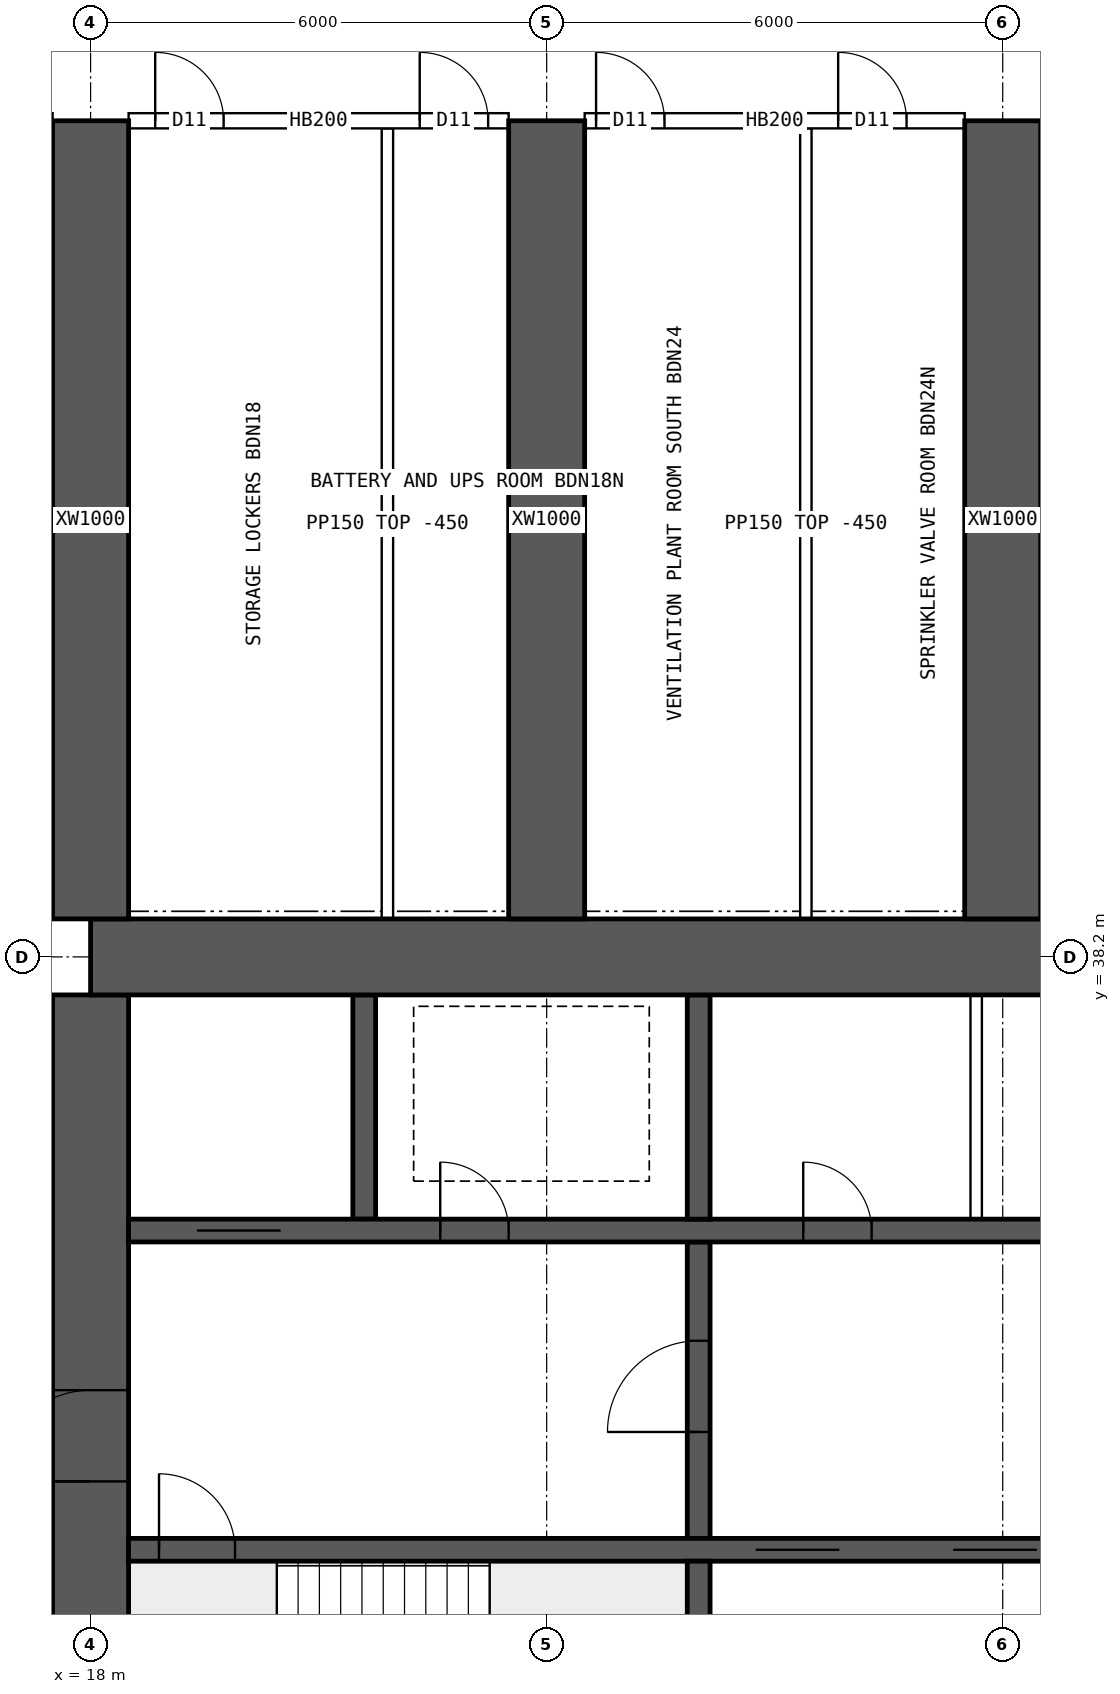
"""IFC4 building model, lengths in metres.
Left out: names, types, materials, properties, quantities, classifications, styles, units other than length and angle.
Written with IfcOpenShell. Run it as: python <this file> out.ifc"""

import sys

from ifc_helpers import new_model, si_unit, direction, frame, frame_2d, origin, place, context, subcontext, project, spatial, rectangle, extrude, element, fill, save


model = new_model("IFC4")
c1 = context("Model", 3, precision=1e-05, world=origin(), true_north=direction((0.0, 1.0)))
c2 = subcontext(c1, "Body", "Model", "MODEL_VIEW")
j1 = project(units=[si_unit("LENGTHUNIT", "METRE"), si_unit("PLANEANGLEUNIT", "RADIAN")], contexts=[c1])
p1 = place(None, origin())
s1 = spatial("IfcSite", under=j1, at=p1, CompositionType="ELEMENT")
p2 = place(p1, origin())
s2 = spatial("IfcBuilding", under=s1, at=p2, CompositionType="ELEMENT")
p3 = place(p2, frame((0.0, 0.0, 50.2)))
s3 = spatial("IfcBuildingStorey", under=s2, at=p3, CompositionType="ELEMENT", Elevation=50.2)
p4 = place(p3, frame((18.0, 38.2, 0.0), z_axis=(0.0, 0.0, 1.0), x_axis=(1.0, 0.0, 0.0)))
e1 = element("IfcWall", 1, at=p4, inside=s3, PredefinedType="SHEAR", context=c2, shape_type="SweptSolid", body=[
    extrude(rectangle(XDim=48.0, YDim=1.0, at=frame_2d((24.0, 0.0))), origin(), (0.0, 0.0, 1.0), 3.75),
])
p5 = place(p3, frame((18.0, 26.3, 0.0), z_axis=(0.0, 0.0, 1.0), x_axis=(0.0, 1.0, 0.0)))
e2 = element("IfcWall", 2, at=p5, inside=s3, PredefinedType="SHEAR", context=c2, shape_type="SweptSolid", body=[
    extrude(rectangle(XDim=11.4, YDim=1.0, at=frame_2d((5.7, 0.0))), origin(), (0.0, 0.0, 1.0), 3.75),
])
p6 = place(p5, frame((5.0, 0.0, 0.0)))
e3 = element("IfcOpeningElement", 3, at=p6, cuts=e2, PredefinedType="OPENING", context=c2, shape_type="SweptSolid", body=[
    extrude(rectangle(XDim=1.2, YDim=2.1, at=frame_2d((0.6, 1.05))), frame((0.0, 0.51, 0.0), z_axis=(0.0, -1.0, 0.0), x_axis=(1.0, 0.0, 0.0)), (0.0, 0.0, 1.0), 1.02),
])
p7 = place(p3, frame((18.5, 30.4, 0.0), z_axis=(0.0, 0.0, 1.0), x_axis=(1.0, 0.0, 0.0)))
e4 = element("IfcWall", 4, at=p7, inside=s3, PredefinedType="SHEAR", context=c2, shape_type="SweptSolid", body=[
    extrude(rectangle(XDim=47.0, YDim=0.3, at=frame_2d((23.5, 0.0))), origin(), (0.0, 0.0, 1.0), 3.75),
])
p8 = place(p7, frame((0.4, 0.0, 0.0)))
e5 = element("IfcOpeningElement", 5, at=p8, cuts=e4, PredefinedType="OPENING", context=c2, shape_type="SweptSolid", body=[
    extrude(rectangle(XDim=1.0, YDim=2.1, at=frame_2d((0.5, 1.05))), frame((0.0, 0.16, 0.0), z_axis=(0.0, -1.0, 0.0), x_axis=(1.0, 0.0, 0.0)), (0.0, 0.0, 1.0), 0.32),
])
p9 = place(p7, frame((45.6, 0.0, 0.0)))
e6 = element("IfcOpeningElement", 6, at=p9, cuts=e4, PredefinedType="OPENING", context=c2, shape_type="SweptSolid", body=[
    extrude(rectangle(XDim=1.0, YDim=2.1, at=frame_2d((0.5, 1.05))), frame((0.0, 0.16, 0.0), z_axis=(0.0, -1.0, 0.0), x_axis=(1.0, 0.0, 0.0)), (0.0, 0.0, 1.0), 0.32),
])
p10 = place(p7, frame((8.25, 0.0, 0.0)))
e7 = element("IfcOpeningElement", 7, at=p10, cuts=e4, PredefinedType="OPENING", context=c2, shape_type="SweptSolid", body=[
    extrude(rectangle(XDim=1.1, YDim=2.1, at=frame_2d((0.55, 1.05))), frame((0.0, 0.16, 0.0), z_axis=(0.0, -1.0, 0.0), x_axis=(1.0, 0.0, 0.0)), (0.0, 0.0, 1.0), 0.32),
])
p11 = place(p7, frame((10.85, 0.0, 0.0)))
e8 = element("IfcOpeningElement", 8, at=p11, cuts=e4, PredefinedType="OPENING", context=c2, shape_type="SweptSolid", body=[
    extrude(rectangle(XDim=1.1, YDim=2.1, at=frame_2d((0.55, 1.05))), frame((0.0, 0.16, 0.0), z_axis=(0.0, -1.0, 0.0), x_axis=(1.0, 0.0, 0.0)), (0.0, 0.0, 1.0), 0.32),
])
p12 = place(p7, frame((13.45, 0.0, 0.0)))
e9 = element("IfcOpeningElement", 9, at=p12, cuts=e4, PredefinedType="OPENING", context=c2, shape_type="SweptSolid", body=[
    extrude(rectangle(XDim=1.1, YDim=2.1, at=frame_2d((0.55, 1.05))), frame((0.0, 0.16, 0.0), z_axis=(0.0, -1.0, 0.0), x_axis=(1.0, 0.0, 0.0)), (0.0, 0.0, 1.0), 0.32),
])
p13 = place(p7, frame((16.05, 0.0, 0.0)))
e10 = element("IfcOpeningElement", 10, at=p13, cuts=e4, PredefinedType="OPENING", context=c2, shape_type="SweptSolid", body=[
    extrude(rectangle(XDim=1.1, YDim=2.1, at=frame_2d((0.55, 1.05))), frame((0.0, 0.16, 0.0), z_axis=(0.0, -1.0, 0.0), x_axis=(1.0, 0.0, 0.0)), (0.0, 0.0, 1.0), 0.32),
])
p14 = place(p7, frame((30.117, 0.0, 0.0)))
e11 = element("IfcOpeningElement", 11, at=p14, cuts=e4, PredefinedType="OPENING", context=c2, shape_type="SweptSolid", body=[
    extrude(rectangle(XDim=1.1, YDim=2.1, at=frame_2d((0.55, 1.05))), frame((0.0, 0.16, 0.0), z_axis=(0.0, -1.0, 0.0), x_axis=(1.0, 0.0, 0.0)), (0.0, 0.0, 1.0), 0.32),
])
p15 = place(p7, frame((33.65, 0.0, 0.0)))
e12 = element("IfcOpeningElement", 12, at=p15, cuts=e4, PredefinedType="OPENING", context=c2, shape_type="SweptSolid", body=[
    extrude(rectangle(XDim=1.1, YDim=2.1, at=frame_2d((0.55, 1.05))), frame((0.0, 0.16, 0.0), z_axis=(0.0, -1.0, 0.0), x_axis=(1.0, 0.0, 0.0)), (0.0, 0.0, 1.0), 0.32),
])
p16 = place(p7, frame((37.183, 0.0, 0.0)))
e13 = element("IfcOpeningElement", 13, at=p16, cuts=e4, PredefinedType="OPENING", context=c2, shape_type="SweptSolid", body=[
    extrude(rectangle(XDim=1.1, YDim=2.1, at=frame_2d((0.55, 1.05))), frame((0.0, 0.16, 0.0), z_axis=(0.0, -1.0, 0.0), x_axis=(1.0, 0.0, 0.0)), (0.0, 0.0, 1.0), 0.32),
])
p17 = place(p3, frame((18.5, 34.6, 0.0), z_axis=(0.0, 0.0, 1.0), x_axis=(1.0, 0.0, 0.0)))
e14 = element("IfcWall", 14, at=p17, inside=s3, PredefinedType="SHEAR", context=c2, shape_type="SweptSolid", body=[
    extrude(rectangle(XDim=47.0, YDim=0.3, at=frame_2d((23.5, 0.0))), origin(), (0.0, 0.0, 1.0), 3.75),
])
p18 = place(p17, frame((0.9, 0.0, 0.0)))
e15 = element("IfcOpeningElement", 15, at=p18, cuts=e14, PredefinedType="OPENING", context=c2, shape_type="SweptSolid", body=[
    extrude(rectangle(XDim=1.1, YDim=2.1, at=frame_2d((0.55, 1.05))), frame((0.0, 0.16, 0.0), z_axis=(0.0, -1.0, 0.0), x_axis=(1.0, 0.0, 0.0)), (0.0, 0.0, 1.0), 0.32),
])
p19 = place(p17, frame((45.0, 0.0, 0.0)))
e16 = element("IfcOpeningElement", 16, at=p19, cuts=e14, PredefinedType="OPENING", context=c2, shape_type="SweptSolid", body=[
    extrude(rectangle(XDim=1.1, YDim=2.1, at=frame_2d((0.55, 1.05))), frame((0.0, 0.16, 0.0), z_axis=(0.0, -1.0, 0.0), x_axis=(1.0, 0.0, 0.0)), (0.0, 0.0, 1.0), 0.32),
])
p20 = place(p17, frame((4.1, 0.0, 0.0)))
e17 = element("IfcOpeningElement", 17, at=p20, cuts=e14, PredefinedType="OPENING", context=c2, shape_type="SweptSolid", body=[
    extrude(rectangle(XDim=0.9, YDim=2.1, at=frame_2d((0.45, 1.05))), frame((0.0, 0.16, 0.0), z_axis=(0.0, -1.0, 0.0), x_axis=(1.0, 0.0, 0.0)), (0.0, 0.0, 1.0), 0.32),
])
p21 = place(p17, frame((42.0, 0.0, 0.0)))
e18 = element("IfcOpeningElement", 18, at=p21, cuts=e14, PredefinedType="OPENING", context=c2, shape_type="SweptSolid", body=[
    extrude(rectangle(XDim=0.9, YDim=2.1, at=frame_2d((0.45, 1.05))), frame((0.0, 0.16, 0.0), z_axis=(0.0, -1.0, 0.0), x_axis=(1.0, 0.0, 0.0)), (0.0, 0.0, 1.0), 0.32),
])
p22 = place(p17, frame((8.875, 0.0, 0.0)))
e19 = element("IfcOpeningElement", 19, at=p22, cuts=e14, PredefinedType="OPENING", context=c2, shape_type="SweptSolid", body=[
    extrude(rectangle(XDim=0.9, YDim=2.1, at=frame_2d((0.45, 1.05))), frame((0.0, 0.16, 0.0), z_axis=(0.0, -1.0, 0.0), x_axis=(1.0, 0.0, 0.0)), (0.0, 0.0, 1.0), 0.32),
])
p23 = place(p17, frame((12.849, 0.0, 0.0)))
e20 = element("IfcOpeningElement", 20, at=p23, cuts=e14, PredefinedType="OPENING", context=c2, shape_type="SweptSolid", body=[
    extrude(rectangle(XDim=0.9, YDim=2.1, at=frame_2d((0.45, 1.05))), frame((0.0, 0.16, 0.0), z_axis=(0.0, -1.0, 0.0), x_axis=(1.0, 0.0, 0.0)), (0.0, 0.0, 1.0), 0.32),
])
p24 = place(p17, frame((16.496, 0.0, 0.0)))
e21 = element("IfcOpeningElement", 21, at=p24, cuts=e14, PredefinedType="OPENING", context=c2, shape_type="SweptSolid", body=[
    extrude(rectangle(XDim=0.9, YDim=2.1, at=frame_2d((0.45, 1.05))), frame((0.0, 0.16, 0.0), z_axis=(0.0, -1.0, 0.0), x_axis=(1.0, 0.0, 0.0)), (0.0, 0.0, 1.0), 0.32),
])
p25 = place(p17, frame((20.255, 0.0, 0.0)))
e22 = element("IfcOpeningElement", 22, at=p25, cuts=e14, PredefinedType="OPENING", context=c2, shape_type="SweptSolid", body=[
    extrude(rectangle(XDim=0.9, YDim=2.1, at=frame_2d((0.45, 1.05))), frame((0.0, 0.16, 0.0), z_axis=(0.0, -1.0, 0.0), x_axis=(1.0, 0.0, 0.0)), (0.0, 0.0, 1.0), 0.32),
])
p26 = place(p17, frame((24.661, 0.0, 0.0)))
e23 = element("IfcOpeningElement", 23, at=p26, cuts=e14, PredefinedType="OPENING", context=c2, shape_type="SweptSolid", body=[
    extrude(rectangle(XDim=0.9, YDim=2.1, at=frame_2d((0.45, 1.05))), frame((0.0, 0.16, 0.0), z_axis=(0.0, -1.0, 0.0), x_axis=(1.0, 0.0, 0.0)), (0.0, 0.0, 1.0), 0.32),
])
p27 = place(p17, frame((27.458, 0.0, 0.0)))
e24 = element("IfcOpeningElement", 24, at=p27, cuts=e14, PredefinedType="OPENING", context=c2, shape_type="SweptSolid", body=[
    extrude(rectangle(XDim=0.9, YDim=2.1, at=frame_2d((0.45, 1.05))), frame((0.0, 0.16, 0.0), z_axis=(0.0, -1.0, 0.0), x_axis=(1.0, 0.0, 0.0)), (0.0, 0.0, 1.0), 0.32),
])
p28 = place(p17, frame((29.628, 0.0, 0.0)))
e25 = element("IfcOpeningElement", 25, at=p28, cuts=e14, PredefinedType="OPENING", context=c2, shape_type="SweptSolid", body=[
    extrude(rectangle(XDim=0.9, YDim=2.1, at=frame_2d((0.45, 1.05))), frame((0.0, 0.16, 0.0), z_axis=(0.0, -1.0, 0.0), x_axis=(1.0, 0.0, 0.0)), (0.0, 0.0, 1.0), 0.32),
])
p29 = place(p17, frame((33.427, 0.0, 0.0)))
e26 = element("IfcOpeningElement", 26, at=p29, cuts=e14, PredefinedType="OPENING", context=c2, shape_type="SweptSolid", body=[
    extrude(rectangle(XDim=0.9, YDim=2.1, at=frame_2d((0.45, 1.05))), frame((0.0, 0.16, 0.0), z_axis=(0.0, -1.0, 0.0), x_axis=(1.0, 0.0, 0.0)), (0.0, 0.0, 1.0), 0.32),
])
p30 = place(p17, frame((37.378, 0.0, 0.0)))
e27 = element("IfcOpeningElement", 27, at=p30, cuts=e14, PredefinedType="OPENING", context=c2, shape_type="SweptSolid", body=[
    extrude(rectangle(XDim=0.9, YDim=2.1, at=frame_2d((0.45, 1.05))), frame((0.0, 0.16, 0.0), z_axis=(0.0, -1.0, 0.0), x_axis=(1.0, 0.0, 0.0)), (0.0, 0.0, 1.0), 0.32),
])
p31 = place(p3, frame((26.0, 26.3, 0.0), z_axis=(0.0, 0.0, 1.0), x_axis=(0.0, 1.0, 0.0)))
e28 = element("IfcWall", 28, at=p31, inside=s3, PredefinedType="SHEAR", context=c2, shape_type="SweptSolid", body=[
    extrude(rectangle(XDim=3.95, YDim=0.3, at=frame_2d((1.975, 0.0))), origin(), (0.0, 0.0, 1.0), 3.75),
])
p32 = place(p3, frame((26.0, 30.55, 0.0), z_axis=(0.0, 0.0, 1.0), x_axis=(0.0, 1.0, 0.0)))
e29 = element("IfcWall", 29, at=p32, inside=s3, PredefinedType="SHEAR", context=c2, shape_type="SweptSolid", body=[
    extrude(rectangle(XDim=3.9, YDim=0.3, at=frame_2d((1.95, 0.0))), origin(), (0.0, 0.0, 1.0), 3.75),
])
p33 = place(p32, frame((1.4, 0.0, 0.0)))
e30 = element("IfcOpeningElement", 30, at=p33, cuts=e29, PredefinedType="OPENING", context=c2, shape_type="SweptSolid", body=[
    extrude(rectangle(XDim=1.2, YDim=2.1, at=frame_2d((0.6, 1.05))), frame((0.0, 0.16, 0.0), z_axis=(0.0, -1.0, 0.0), x_axis=(1.0, 0.0, 0.0)), (0.0, 0.0, 1.0), 0.32),
])
for number, where, z_axis, x_axis in (
    (31, (21.6, 34.75, 0.0), (0.0, 0.0, 1.0), (0.0, 1.0, 0.0)),
    (32, (26.0, 34.75, 0.0), (0.0, 0.0, 1.0), (0.0, 1.0, 0.0)),
):
    element("IfcWall", number, at=place(p3, frame(where, z_axis=z_axis, x_axis=x_axis)), inside=s3, PredefinedType="SHEAR", context=c2, shape_type="SweptSolid", body=[
        extrude(rectangle(XDim=2.95, YDim=0.3, at=frame_2d((1.475, 0.0))), origin(), (0.0, 0.0, 1.0), 3.75),
    ])
for number, where, z_axis, x_axis in (
    (33, (18.0, 38.7, 0.0), (0.0, 0.0, 1.0), (0.0, 1.0, 0.0)),
    (34, (24.0, 38.7, 0.0), (0.0, 0.0, 1.0), (0.0, 1.0, 0.0)),
    (35, (30.0, 38.7, 0.0), (0.0, 0.0, 1.0), (0.0, 1.0, 0.0)),
):
    element("IfcWall", number, at=place(p3, frame(where, z_axis=z_axis, x_axis=x_axis)), inside=s3, PredefinedType="SHEAR", context=c2, shape_type="SweptSolid", body=[
        extrude(rectangle(XDim=10.5, YDim=1.0, at=frame_2d((5.25, 0.0))), origin(), (0.0, 0.0, 1.0), 3.75),
    ])
p34 = place(p3, frame((29.651, 34.75, 0.0), z_axis=(0.0, 0.0, 1.0), x_axis=(0.0, 1.0, 0.0)))
e36 = element("IfcWall", 36, at=p34, inside=s3, PredefinedType="SOLIDWALL", context=c2, shape_type="SweptSolid", body=[
    extrude(rectangle(XDim=2.95, YDim=0.15, at=frame_2d((1.475, 0.0))), origin(), (0.0, 0.0, 1.0), 3.3),
])
p35 = place(p3, frame((18.5, 49.2, 0.0), z_axis=(0.0, 0.0, 1.0), x_axis=(1.0, 0.0, 0.0)))
e37 = element("IfcWall", 37, at=p35, inside=s3, PredefinedType="SOLIDWALL", context=c2, shape_type="SweptSolid", body=[
    extrude(rectangle(XDim=5.0, YDim=0.2, at=frame_2d((2.5, 0.0))), origin(), (0.0, 0.0, 1.0), 3.3),
])
p36 = place(p35, frame((0.35, 0.0, 0.0)))
e38 = element("IfcOpeningElement", 38, at=p36, cuts=e37, PredefinedType="OPENING", context=c2, shape_type="SweptSolid", body=[
    extrude(rectangle(XDim=0.9, YDim=2.1, at=frame_2d((0.45, 1.05))), frame((0.0, 0.11, 0.0), z_axis=(0.0, -1.0, 0.0), x_axis=(1.0, 0.0, 0.0)), (0.0, 0.0, 1.0), 0.22),
])
p37 = place(p35, frame((3.83, 0.0, 0.0)))
e39 = element("IfcOpeningElement", 39, at=p37, cuts=e37, PredefinedType="OPENING", context=c2, shape_type="SweptSolid", body=[
    extrude(rectangle(XDim=0.9, YDim=2.1, at=frame_2d((0.45, 1.05))), frame((0.0, 0.11, 0.0), z_axis=(0.0, -1.0, 0.0), x_axis=(1.0, 0.0, 0.0)), (0.0, 0.0, 1.0), 0.22),
])
p38 = place(p3, frame((24.5, 49.2, 0.0), z_axis=(0.0, 0.0, 1.0), x_axis=(1.0, 0.0, 0.0)))
e40 = element("IfcWall", 40, at=p38, inside=s3, PredefinedType="SOLIDWALL", context=c2, shape_type="SweptSolid", body=[
    extrude(rectangle(XDim=5.0, YDim=0.2, at=frame_2d((2.5, 0.0))), origin(), (0.0, 0.0, 1.0), 3.3),
])
p39 = place(p38, frame((0.15, 0.0, 0.0)))
e41 = element("IfcOpeningElement", 41, at=p39, cuts=e40, PredefinedType="OPENING", context=c2, shape_type="SweptSolid", body=[
    extrude(rectangle(XDim=0.9, YDim=2.1, at=frame_2d((0.45, 1.05))), frame((0.0, 0.11, 0.0), z_axis=(0.0, -1.0, 0.0), x_axis=(1.0, 0.0, 0.0)), (0.0, 0.0, 1.0), 0.22),
])
p40 = place(p38, frame((3.335, 0.0, 0.0)))
e42 = element("IfcOpeningElement", 42, at=p40, cuts=e40, PredefinedType="OPENING", context=c2, shape_type="SweptSolid", body=[
    extrude(rectangle(XDim=0.9, YDim=2.1, at=frame_2d((0.45, 1.05))), frame((0.0, 0.11, 0.0), z_axis=(0.0, -1.0, 0.0), x_axis=(1.0, 0.0, 0.0)), (0.0, 0.0, 1.0), 0.22),
])
for number, where, z_axis, x_axis in (
    (43, (21.905, 38.7, 0.0), (0.0, 0.0, 1.0), (0.0, 1.0, 0.0)),
    (44, (27.41, 38.7, 0.0), (0.0, 0.0, 1.0), (0.0, 1.0, 0.0)),
):
    element("IfcWall", number, at=place(p3, frame(where, z_axis=z_axis, x_axis=x_axis)), inside=s3, PredefinedType="PARTITIONING", context=c2, shape_type="SweptSolid", body=[
        extrude(rectangle(XDim=10.4, YDim=0.15, at=frame_2d((5.2, 0.0))), origin(), (0.0, 0.0, 1.0), 3.3),
    ])
p41 = place(p3, frame((30.5, 48.0, 0.0), z_axis=(0.0, 0.0, 1.0), x_axis=(1.0, 0.0, 0.0)))
e45 = element("IfcWall", 45, at=p41, inside=s3, PredefinedType="SOLIDWALL", context=c2, shape_type="SweptSolid", body=[
    extrude(rectangle(XDim=5.0, YDim=0.2, at=frame_2d((2.5, 0.0))), origin(), (0.0, 0.0, 1.0), 3.3),
])
p42 = place(p41, frame((0.8, 0.0, 0.0)))
e46 = element("IfcOpeningElement", 46, at=p42, cuts=e45, PredefinedType="OPENING", context=c2, shape_type="SweptSolid", body=[
    extrude(rectangle(XDim=1.0, YDim=2.1, at=frame_2d((0.5, 1.05))), frame((0.0, 0.11, 0.0), z_axis=(0.0, -1.0, 0.0), x_axis=(1.0, 0.0, 0.0)), (0.0, 0.0, 1.0), 0.22),
])
p43 = place(p6, origin())
e47 = element("IfcDoor", 47, at=p43, inside=s3, OperationType="SINGLE_SWING_LEFT", PredefinedType="DOOR", context=c2, shape_type="SweptSolid", body=[
    extrude(rectangle(XDim=1.2, YDim=2.1, at=frame_2d((0.6, 1.05))), frame((0.0, 0.025, 0.0), z_axis=(0.0, -1.0, 0.0), x_axis=(1.0, 0.0, 0.0)), (0.0, 0.0, 1.0), 0.05),
])
fill(e3, e47)
p44 = place(p8, origin())
e48 = element("IfcDoor", 48, at=p44, inside=s3, OperationType="SINGLE_SWING_LEFT", PredefinedType="DOOR", context=c2, shape_type="SweptSolid", body=[
    extrude(rectangle(XDim=1.0, YDim=2.1, at=frame_2d((0.5, 1.05))), frame((0.0, 0.025, 0.0), z_axis=(0.0, -1.0, 0.0), x_axis=(1.0, 0.0, 0.0)), (0.0, 0.0, 1.0), 0.05),
])
fill(e5, e48)
p45 = place(p18, origin())
e49 = element("IfcDoor", 49, at=p45, inside=s3, OperationType="DOUBLE_DOOR_SLIDING", PredefinedType="DOOR", context=c2, shape_type="SweptSolid", body=[
    extrude(rectangle(XDim=1.1, YDim=2.1, at=frame_2d((0.55, 1.05))), frame((0.0, 0.025, 0.0), z_axis=(0.0, -1.0, 0.0), x_axis=(1.0, 0.0, 0.0)), (0.0, 0.0, 1.0), 0.05),
])
fill(e15, e49)
p46 = place(p20, origin())
e50 = element("IfcDoor", 50, at=p46, inside=s3, OperationType="SINGLE_SWING_LEFT", PredefinedType="DOOR", context=c2, shape_type="SweptSolid", body=[
    extrude(rectangle(XDim=0.9, YDim=2.1, at=frame_2d((0.45, 1.05))), frame((0.0, 0.025, 0.0), z_axis=(0.0, -1.0, 0.0), x_axis=(1.0, 0.0, 0.0)), (0.0, 0.0, 1.0), 0.05),
])
fill(e17, e50)
p47 = place(p33, origin())
e51 = element("IfcDoor", 51, at=p47, inside=s3, OperationType="SINGLE_SWING_LEFT", PredefinedType="DOOR", context=c2, shape_type="SweptSolid", body=[
    extrude(rectangle(XDim=1.2, YDim=2.1, at=frame_2d((0.6, 1.05))), frame((0.0, 0.025, 0.0), z_axis=(0.0, -1.0, 0.0), x_axis=(1.0, 0.0, 0.0)), (0.0, 0.0, 1.0), 0.05),
])
fill(e30, e51)
p48 = place(p22, origin())
e52 = element("IfcDoor", 52, at=p48, inside=s3, OperationType="SINGLE_SWING_LEFT", PredefinedType="DOOR", context=c2, shape_type="SweptSolid", body=[
    extrude(rectangle(XDim=0.9, YDim=2.1, at=frame_2d((0.45, 1.05))), frame((0.0, 0.025, 0.0), z_axis=(0.0, -1.0, 0.0), x_axis=(1.0, 0.0, 0.0)), (0.0, 0.0, 1.0), 0.05),
])
fill(e19, e52)
p49 = place(p10, origin())
e53 = element("IfcDoor", 53, at=p49, inside=s3, OperationType="DOUBLE_DOOR_SLIDING", PredefinedType="DOOR", context=c2, shape_type="SweptSolid", body=[
    extrude(rectangle(XDim=1.1, YDim=2.1, at=frame_2d((0.55, 1.05))), frame((0.0, 0.025, 0.0), z_axis=(0.0, -1.0, 0.0), x_axis=(1.0, 0.0, 0.0)), (0.0, 0.0, 1.0), 0.05),
])
fill(e7, e53)
p50 = place(p11, origin())
e54 = element("IfcDoor", 54, at=p50, inside=s3, OperationType="DOUBLE_DOOR_SLIDING", PredefinedType="DOOR", context=c2, shape_type="SweptSolid", body=[
    extrude(rectangle(XDim=1.1, YDim=2.1, at=frame_2d((0.55, 1.05))), frame((0.0, 0.025, 0.0), z_axis=(0.0, -1.0, 0.0), x_axis=(1.0, 0.0, 0.0)), (0.0, 0.0, 1.0), 0.05),
])
fill(e8, e54)
p51 = place(p36, origin())
e55 = element("IfcDoor", 55, at=p51, inside=s3, OperationType="SINGLE_SWING_LEFT", PredefinedType="DOOR", context=c2, shape_type="SweptSolid", body=[
    extrude(rectangle(XDim=0.9, YDim=2.1, at=frame_2d((0.45, 1.05))), frame((0.0, 0.025, 0.0), z_axis=(0.0, -1.0, 0.0), x_axis=(1.0, 0.0, 0.0)), (0.0, 0.0, 1.0), 0.05),
])
fill(e38, e55)
p52 = place(p37, origin())
e56 = element("IfcDoor", 56, at=p52, inside=s3, OperationType="SINGLE_SWING_LEFT", PredefinedType="DOOR", context=c2, shape_type="SweptSolid", body=[
    extrude(rectangle(XDim=0.9, YDim=2.1, at=frame_2d((0.45, 1.05))), frame((0.0, 0.025, 0.0), z_axis=(0.0, -1.0, 0.0), x_axis=(1.0, 0.0, 0.0)), (0.0, 0.0, 1.0), 0.05),
])
fill(e39, e56)
p53 = place(p39, origin())
e57 = element("IfcDoor", 57, at=p53, inside=s3, OperationType="SINGLE_SWING_LEFT", PredefinedType="DOOR", context=c2, shape_type="SweptSolid", body=[
    extrude(rectangle(XDim=0.9, YDim=2.1, at=frame_2d((0.45, 1.05))), frame((0.0, 0.025, 0.0), z_axis=(0.0, -1.0, 0.0), x_axis=(1.0, 0.0, 0.0)), (0.0, 0.0, 1.0), 0.05),
])
fill(e41, e57)
p54 = place(p40, origin())
e58 = element("IfcDoor", 58, at=p54, inside=s3, OperationType="SINGLE_SWING_LEFT", PredefinedType="DOOR", context=c2, shape_type="SweptSolid", body=[
    extrude(rectangle(XDim=0.9, YDim=2.1, at=frame_2d((0.45, 1.05))), frame((0.0, 0.025, 0.0), z_axis=(0.0, -1.0, 0.0), x_axis=(1.0, 0.0, 0.0)), (0.0, 0.0, 1.0), 0.05),
])
fill(e42, e58)
save(model, sys.argv[1])
